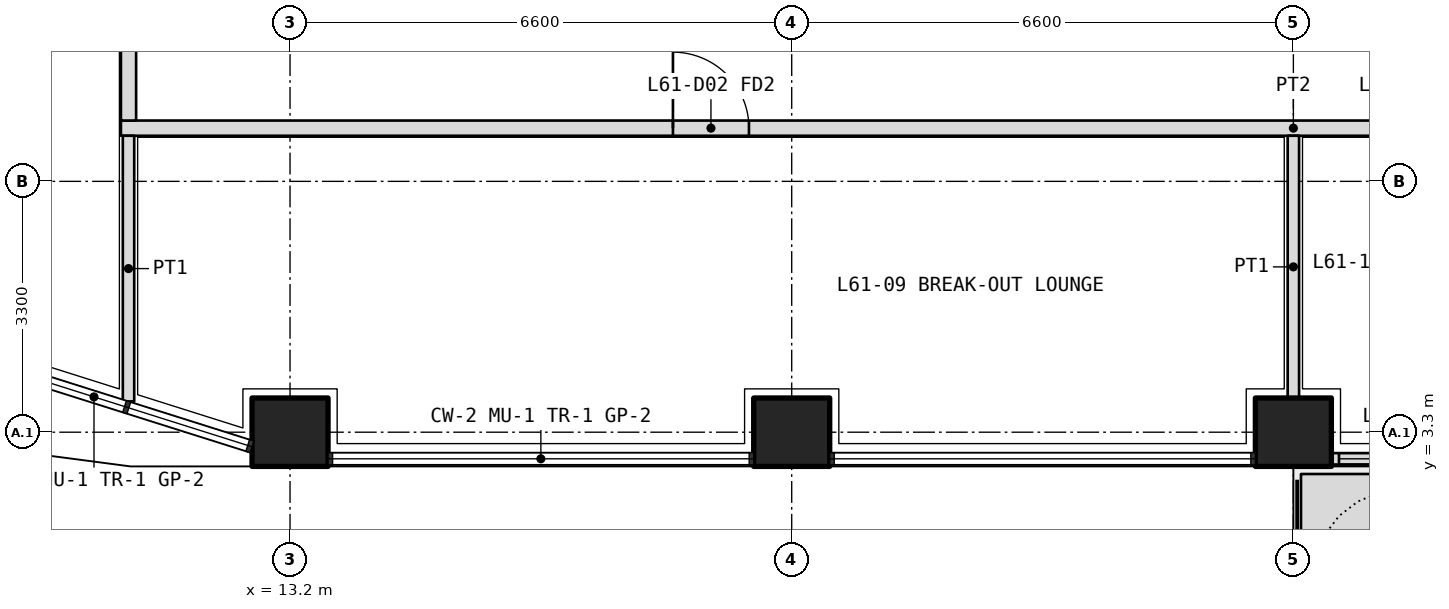
"""IFC4 building model, lengths in metres.
Left out: names, types, materials, properties, quantities, classifications, styles, units other than length and angle.
Written with IfcOpenShell. Run it as: python <this file> out.ifc"""

import sys

from ifc_helpers import new_model, si_unit, direction, frame, frame_2d, origin, origin_2d, place, context, subcontext, project, spatial, polyline, rectangle, outline, extrude, element, fill, save


model = new_model("IFC4")
c1 = context("Model", 3, precision=1e-05, world=origin(), true_north=direction((0.0, 1.0)))
c2 = subcontext(c1, "Body", "Model", "MODEL_VIEW")
j1 = project(units=[si_unit("LENGTHUNIT", "METRE"), si_unit("PLANEANGLEUNIT", "RADIAN")], contexts=[c1])
p1 = place(None, origin())
s1 = spatial("IfcSite", under=j1, at=p1, CompositionType="ELEMENT")
p2 = place(p1, origin())
s2 = spatial("IfcBuilding", under=s1, at=p2, CompositionType="ELEMENT")
p3 = place(p2, frame((0.0, 0.0, 267.0)))
s3 = spatial("IfcBuildingStorey", under=s2, at=p3, CompositionType="ELEMENT", Elevation=267.0)
for number, where, z_axis, x_axis in (
    (1, (13.2, 3.3, 0.0), (0.0, 0.0, 1.0), (1.0, 0.0, 0.0)),
    (2, (19.8, 3.3, 0.0), (0.0, 0.0, 1.0), (1.0, 0.0, 0.0)),
    (3, (26.4, 3.3, 0.0), (0.0, 0.0, 1.0), (1.0, 0.0, 0.0)),
):
    element("IfcColumn", number, at=place(p3, frame(where, z_axis=z_axis, x_axis=x_axis)), inside=s3, PredefinedType="COLUMN", context=c2, shape_type="SweptSolid", body=[
        extrude(rectangle(XDim=1.0, YDim=0.9, at=origin_2d()), origin(), (0.0, 0.0, 1.0), 4.2),
    ])
p4 = place(p3, origin())
e4 = element("IfcWall", 4, at=p4, inside=s3, PredefinedType="USERDEFINED", context=c2, shape_type="SweptSolid", body=[
    extrude(outline(polyline([(26.5, 1.75), (28.95, 1.75), (28.95, 2.75), (26.5, 2.75), (26.5, 1.75)]), holes=[polyline([(26.65, 1.9), (28.8, 1.9), (28.8, 2.6), (26.65, 2.6), (26.65, 1.9)])]), origin(), (0.0, 0.0, 1.0), 1.05),
])
p5 = place(p3, frame((26.9, 2.95, 0.0), z_axis=(0.0, 0.0, 1.0), x_axis=(1.0, 0.0, 0.0)))
e5 = element("IfcWall", 5, at=p5, inside=s3, PredefinedType="SOLIDWALL", context=c2, shape_type="SweptSolid", body=[
    extrude(rectangle(XDim=5.6, YDim=0.15, at=frame_2d((2.8, 0.0))), origin(), (0.0, 0.0, 1.0), 2.7),
])
p6 = place(p5, frame((3.05, 0.0, 0.0)))
e6 = element("IfcOpeningElement", 6, at=p6, cuts=e5, PredefinedType="OPENING", context=c2, shape_type="SweptSolid", body=[
    extrude(rectangle(XDim=1.0, YDim=2.4, at=frame_2d((0.5, 1.2))), frame((0.0, 0.085, 0.0), z_axis=(0.0, -1.0, 0.0), x_axis=(1.0, 0.0, 0.0)), (0.0, 0.0, 1.0), 0.17),
])
p7 = place(p5, frame((0.1, 0.0, 0.1)))
e7 = element("IfcOpeningElement", 7, at=p7, cuts=e5, PredefinedType="OPENING", context=c2, shape_type="SweptSolid", body=[
    extrude(rectangle(XDim=2.45, YDim=2.3, at=frame_2d((1.225, 1.15))), frame((0.0, 0.085, 0.0), z_axis=(0.0, -1.0, 0.0), x_axis=(1.0, 0.0, 0.0)), (0.0, 0.0, 1.0), 0.17),
])
p8 = place(p5, frame((4.15, 0.0, 0.1)))
e8 = element("IfcOpeningElement", 8, at=p8, cuts=e5, PredefinedType="OPENING", context=c2, shape_type="SweptSolid", body=[
    extrude(rectangle(XDim=1.35, YDim=2.3, at=frame_2d((0.675, 1.15))), frame((0.0, 0.085, 0.0), z_axis=(0.0, -1.0, 0.0), x_axis=(1.0, 0.0, 0.0)), (0.0, 0.0, 1.0), 0.17),
])
p9 = place(p3, frame((10.975, 7.3, 0.0), z_axis=(0.0, 0.0, 1.0), x_axis=(1.0, 0.0, 0.0)))
e9 = element("IfcWall", 9, at=p9, inside=s3, PredefinedType="PARTITIONING", context=c2, shape_type="SweptSolid", body=[
    extrude(rectangle(XDim=30.85, YDim=0.2, at=frame_2d((15.425, 0.0))), origin(), (0.0, 0.0, 1.0), 3.0),
])
p10 = place(p9, frame((7.262, 0.0, 0.0)))
e10 = element("IfcOpeningElement", 10, at=p10, cuts=e9, PredefinedType="OPENING", context=c2, shape_type="SweptSolid", body=[
    extrude(rectangle(XDim=1.0, YDim=2.1, at=frame_2d((0.5, 1.05))), frame((0.0, 0.11, 0.0), z_axis=(0.0, -1.0, 0.0), x_axis=(1.0, 0.0, 0.0)), (0.0, 0.0, 1.0), 0.22),
])
p11 = place(p9, frame((16.625, 0.0, 0.0)))
e11 = element("IfcOpeningElement", 11, at=p11, cuts=e9, PredefinedType="OPENING", context=c2, shape_type="SweptSolid", body=[
    extrude(rectangle(XDim=1.0, YDim=2.1, at=frame_2d((0.5, 1.05))), frame((0.0, 0.11, 0.0), z_axis=(0.0, -1.0, 0.0), x_axis=(1.0, 0.0, 0.0)), (0.0, 0.0, 1.0), 0.22),
])
p12 = place(p9, frame((19.925, 0.0, 0.0)))
e12 = element("IfcOpeningElement", 12, at=p12, cuts=e9, PredefinedType="OPENING", context=c2, shape_type="SweptSolid", body=[
    extrude(rectangle(XDim=1.0, YDim=2.1, at=frame_2d((0.5, 1.05))), frame((0.0, 0.11, 0.0), z_axis=(0.0, -1.0, 0.0), x_axis=(1.0, 0.0, 0.0)), (0.0, 0.0, 1.0), 0.22),
])
p13 = place(p9, frame((25.887, 0.0, 0.0)))
e13 = element("IfcOpeningElement", 13, at=p13, cuts=e9, PredefinedType="OPENING", context=c2, shape_type="SweptSolid", body=[
    extrude(rectangle(XDim=1.0, YDim=2.1, at=frame_2d((0.5, 1.05))), frame((0.0, 0.11, 0.0), z_axis=(0.0, -1.0, 0.0), x_axis=(1.0, 0.0, 0.0)), (0.0, 0.0, 1.0), 0.22),
])
p14 = place(p3, frame((11.075, 7.4, 0.0), z_axis=(0.0, 0.0, 1.0), x_axis=(0.0, 1.0, 0.0)))
e14 = element("IfcWall", 14, at=p14, inside=s3, PredefinedType="PARTITIONING", context=c2, shape_type="SweptSolid", body=[
    extrude(rectangle(XDim=31.4, YDim=0.2, at=frame_2d((15.7, 0.0))), origin(), (0.0, 0.0, 1.0), 3.0),
])
p15 = place(p14, frame((2.35, 0.0, 0.0)))
e15 = element("IfcOpeningElement", 15, at=p15, cuts=e14, PredefinedType="OPENING", context=c2, shape_type="SweptSolid", body=[
    extrude(rectangle(XDim=1.0, YDim=2.1, at=frame_2d((0.5, 1.05))), frame((0.0, 0.11, 0.0), z_axis=(0.0, -1.0, 0.0), x_axis=(1.0, 0.0, 0.0)), (0.0, 0.0, 1.0), 0.22),
])
p16 = place(p14, frame((6.35, 0.0, 0.0)))
e16 = element("IfcOpeningElement", 16, at=p16, cuts=e14, PredefinedType="OPENING", context=c2, shape_type="SweptSolid", body=[
    extrude(rectangle(XDim=1.0, YDim=2.1, at=frame_2d((0.5, 1.05))), frame((0.0, 0.11, 0.0), z_axis=(0.0, -1.0, 0.0), x_axis=(1.0, 0.0, 0.0)), (0.0, 0.0, 1.0), 0.22),
])
p17 = place(p14, frame((9.45, 0.0, 0.0)))
e17 = element("IfcOpeningElement", 17, at=p17, cuts=e14, PredefinedType="OPENING", context=c2, shape_type="SweptSolid", body=[
    extrude(rectangle(XDim=0.9, YDim=2.1, at=frame_2d((0.45, 1.05))), frame((0.0, 0.11, 0.0), z_axis=(0.0, -1.0, 0.0), x_axis=(1.0, 0.0, 0.0)), (0.0, 0.0, 1.0), 0.22),
])
p18 = place(p14, frame((13.35, 0.0, 0.0)))
e18 = element("IfcOpeningElement", 18, at=p18, cuts=e14, PredefinedType="OPENING", context=c2, shape_type="SweptSolid", body=[
    extrude(rectangle(XDim=0.9, YDim=2.1, at=frame_2d((0.45, 1.05))), frame((0.0, 0.11, 0.0), z_axis=(0.0, -1.0, 0.0), x_axis=(1.0, 0.0, 0.0)), (0.0, 0.0, 1.0), 0.22),
])
p19 = place(p14, frame((18.5, 0.0, 0.0)))
e19 = element("IfcOpeningElement", 19, at=p19, cuts=e14, PredefinedType="OPENING", context=c2, shape_type="SweptSolid", body=[
    extrude(rectangle(XDim=1.0, YDim=2.1, at=frame_2d((0.5, 1.05))), frame((0.0, 0.11, 0.0), z_axis=(0.0, -1.0, 0.0), x_axis=(1.0, 0.0, 0.0)), (0.0, 0.0, 1.0), 0.22),
])
p20 = place(p14, frame((23.45, 0.0, 0.0)))
e20 = element("IfcOpeningElement", 20, at=p20, cuts=e14, PredefinedType="OPENING", context=c2, shape_type="SweptSolid", body=[
    extrude(rectangle(XDim=1.0, YDim=2.1, at=frame_2d((0.5, 1.05))), frame((0.0, 0.11, 0.0), z_axis=(0.0, -1.0, 0.0), x_axis=(1.0, 0.0, 0.0)), (0.0, 0.0, 1.0), 0.22),
])
p21 = place(p14, frame((28.05, 0.0, 0.0)))
e21 = element("IfcOpeningElement", 21, at=p21, cuts=e14, PredefinedType="OPENING", context=c2, shape_type="SweptSolid", body=[
    extrude(rectangle(XDim=1.0, YDim=2.1, at=frame_2d((0.5, 1.05))), frame((0.0, 0.11, 0.0), z_axis=(0.0, -1.0, 0.0), x_axis=(1.0, 0.0, 0.0)), (0.0, 0.0, 1.0), 0.22),
])
p22 = place(p3, frame((11.075, 3.705, 0.0), z_axis=(0.0, 0.0, 1.0), x_axis=(0.0, 1.0, 0.0)))
e22 = element("IfcWall", 22, at=p22, inside=s3, PredefinedType="PARTITIONING", context=c2, shape_type="SweptSolid", body=[
    extrude(rectangle(XDim=3.495, YDim=0.15, at=frame_2d((1.748, 0.0))), origin(), (0.0, 0.0, 1.0), 2.7),
])
p23 = place(p3, frame((26.4, 3.75, 0.0), z_axis=(0.0, 0.0, 1.0), x_axis=(0.0, 1.0, 0.0)))
e23 = element("IfcWall", 23, at=p23, inside=s3, PredefinedType="PARTITIONING", context=c2, shape_type="SweptSolid", body=[
    extrude(rectangle(XDim=3.45, YDim=0.15, at=frame_2d((1.725, 0.0))), origin(), (0.0, 0.0, 1.0), 3.0),
])
p24 = place(p7, origin())
e24 = element("IfcWindow", 24, at=p24, inside=s3, PartitioningType="SINGLE_PANEL", PredefinedType="WINDOW", context=c2, shape_type="SweptSolid", body=[
    extrude(rectangle(XDim=2.45, YDim=2.3, at=frame_2d((1.225, 1.15))), frame((0.0, 0.03, 0.0), z_axis=(0.0, -1.0, 0.0), x_axis=(1.0, 0.0, 0.0)), (0.0, 0.0, 1.0), 0.06),
])
fill(e7, e24)
p25 = place(p10, origin())
e25 = element("IfcDoor", 25, at=p25, inside=s3, OperationType="SINGLE_SWING_LEFT", PredefinedType="DOOR", context=c2, shape_type="SweptSolid", body=[
    extrude(rectangle(XDim=1.0, YDim=2.1, at=frame_2d((0.5, 1.05))), frame((0.0, 0.025, 0.0), z_axis=(0.0, -1.0, 0.0), x_axis=(1.0, 0.0, 0.0)), (0.0, 0.0, 1.0), 0.05),
])
fill(e10, e25)
save(model, sys.argv[1])
